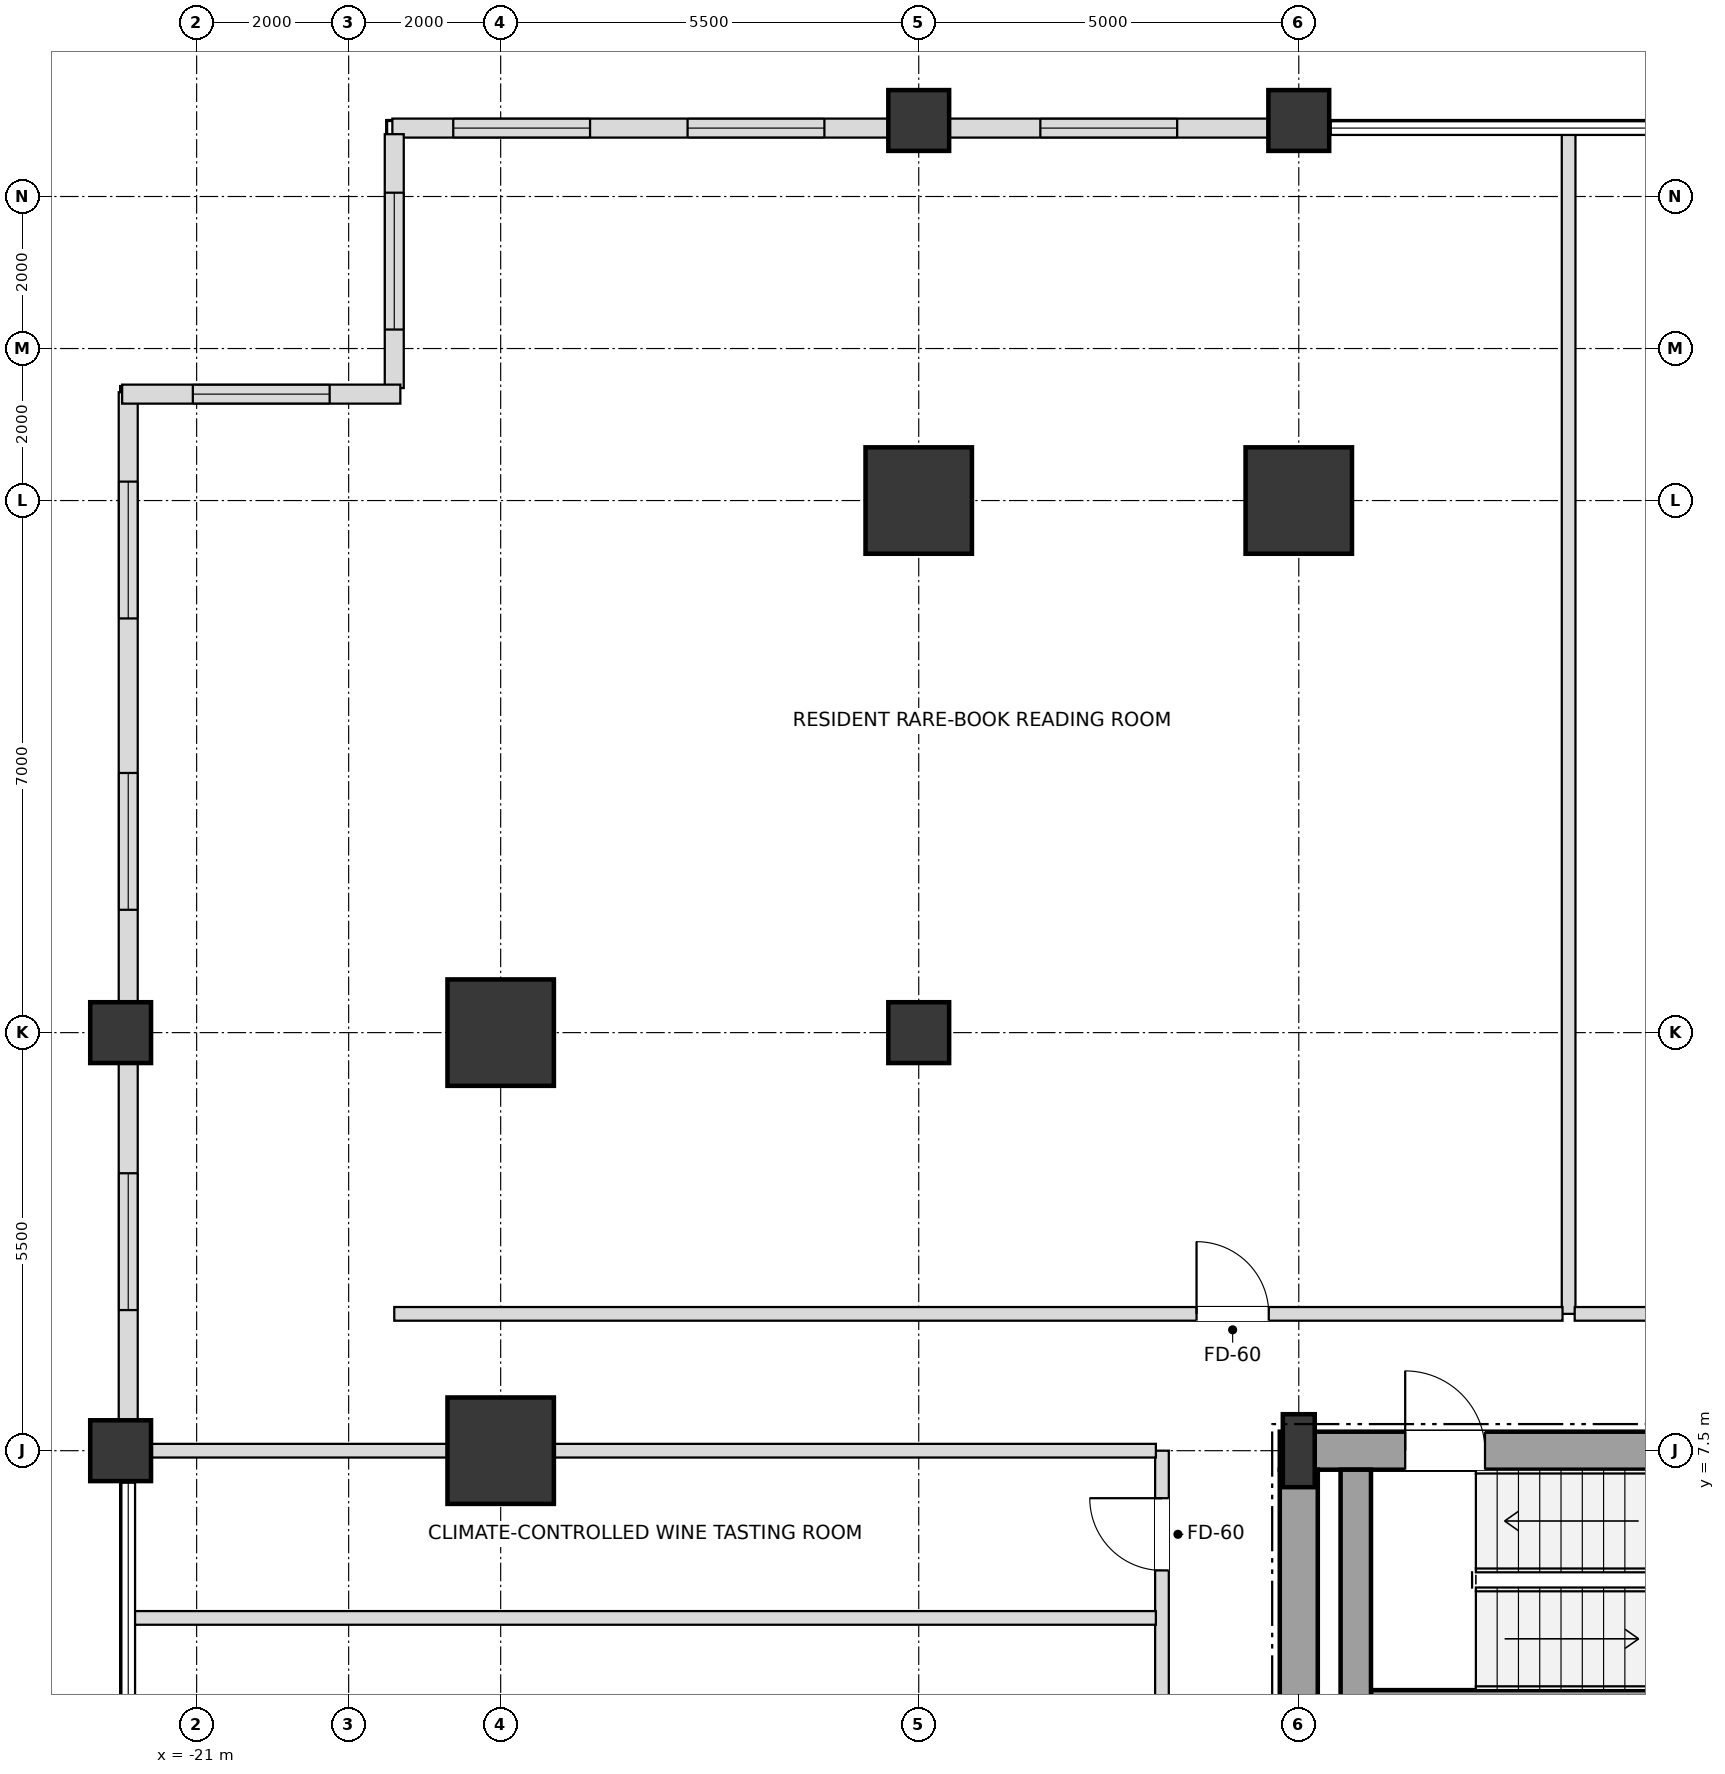
"""IFC4 building model, lengths in metres.
Left out: names, types, materials, properties, quantities, classifications, styles, units other than length and angle.
Written with IfcOpenShell. Run it as: python <this file> out.ifc"""

import sys

from ifc_helpers import new_model, si_unit, direction, frame, frame_2d, origin, origin_2d, place, context, subcontext, project, spatial, rectangle, i_section, extrude, element, fill, save


model = new_model("IFC4")
c1 = context("Model", 3, precision=1e-05, world=origin(), true_north=direction((0.0, 1.0)))
c2 = subcontext(c1, "Body", "Model", "MODEL_VIEW")
j1 = project(units=[si_unit("LENGTHUNIT", "METRE"), si_unit("PLANEANGLEUNIT", "RADIAN")], contexts=[c1])
p1 = place(None, origin())
s1 = spatial("IfcSite", under=j1, at=p1, CompositionType="ELEMENT")
p2 = place(p1, origin())
s2 = spatial("IfcBuilding", under=s1, at=p2, CompositionType="ELEMENT")
p3 = place(p2, frame((0.0, 0.0, 86.4)))
s3 = spatial("IfcBuildingStorey", under=s2, at=p3, CompositionType="ELEMENT", Elevation=86.4)
p4 = place(p3, frame((-6.5, 7.5, 0.0), z_axis=(0.0, 0.0, 1.0), x_axis=(1.0, 0.0, 0.0)))
e1 = element("IfcColumn", 1, at=p4, inside=s3, PredefinedType="COLUMN", context=c2, shape_type="SweptSolid", body=[
    extrude(i_section(OverallWidth=0.42, OverallDepth=0.96, WebThickness=0.022, FlangeThickness=0.034, at=origin_2d()), origin(), (0.0, 0.0, 1.0), 3.6),
])
for number, where, z_axis, x_axis in (
    (2, (-6.5, 20.0, 0.0), (0.0, 0.0, 1.0), (1.0, 0.0, 0.0)),
    (3, (-11.5, 20.0, 0.0), (0.0, 0.0, 1.0), (1.0, 0.0, 0.0)),
    (4, (-17.0, 13.0, 0.0), (0.0, 0.0, 1.0), (1.0, 0.0, 0.0)),
    (5, (-17.0, 7.5, 0.0), (0.0, 0.0, 1.0), (1.0, 0.0, 0.0)),
):
    element("IfcColumn", number, at=place(p3, frame(where, z_axis=z_axis, x_axis=x_axis)), inside=s3, PredefinedType="USERDEFINED", context=c2, shape_type="SweptSolid", body=[
        extrude(rectangle(XDim=1.4, YDim=1.4, at=origin_2d()), origin(), (0.0, 0.0, 1.0), 3.6),
    ])
for number, where, z_axis, x_axis in (
    (6, (-11.5, 13.0, 0.0), (0.0, 0.0, 1.0), (1.0, 0.0, 0.0)),
    (7, (-22.0, 7.5, 0.0), (0.0, 0.0, 1.0), (1.0, 0.0, 0.0)),
    (8, (-22.0, 13.0, 0.0), (0.0, 0.0, 1.0), (1.0, 0.0, 0.0)),
    (9, (-11.5, 25.0, 0.0), (0.0, 0.0, 1.0), (1.0, 0.0, 0.0)),
    (10, (-6.5, 25.0, 0.0), (0.0, 0.0, 1.0), (1.0, 0.0, 0.0)),
):
    element("IfcColumn", number, at=place(p3, frame(where, z_axis=z_axis, x_axis=x_axis)), inside=s3, PredefinedType="COLUMN", context=c2, shape_type="SweptSolid", body=[
        extrude(rectangle(XDim=0.8, YDim=0.8, at=origin_2d()), origin(), (0.0, 0.0, 1.0), 3.6),
    ])
p5 = place(p3, frame((-6.895, 24.9, 0.0), z_axis=(0.0, 0.0, 1.0), x_axis=(-1.0, 0.0, 0.0)))
e11 = element("IfcWall", 11, at=p5, inside=s3, PredefinedType="SOLIDWALL", context=c2, shape_type="SweptSolid", body=[
    extrude(rectangle(XDim=4.21, YDim=0.25, at=frame_2d((2.105, 0.0))), origin(), (0.0, 0.0, 1.0), 2.736),
])
p6 = place(p5, frame((1.205, 0.0, 0.72)))
e12 = element("IfcOpeningElement", 12, at=p6, cuts=e11, PredefinedType="OPENING", context=c2, shape_type="SweptSolid", body=[
    extrude(rectangle(XDim=1.8, YDim=1.68, at=frame_2d((0.9, 0.84))), frame((0.0, 0.135, 0.0), z_axis=(0.0, -1.0, 0.0), x_axis=(1.0, 0.0, 0.0)), (0.0, 0.0, 1.0), 0.27),
])
p7 = place(p3, frame((-11.895, 24.9, 0.0), z_axis=(0.0, 0.0, 1.0), x_axis=(-1.0, 0.0, 0.0)))
e13 = element("IfcWall", 13, at=p7, inside=s3, PredefinedType="SOLIDWALL", context=c2, shape_type="SweptSolid", body=[
    extrude(rectangle(XDim=6.53, YDim=0.25, at=frame_2d((3.265, 0.0))), origin(), (0.0, 0.0, 1.0), 2.736),
])
p8 = place(p7, frame((0.846, 0.0, 0.72)))
e14 = element("IfcOpeningElement", 14, at=p8, cuts=e13, PredefinedType="OPENING", context=c2, shape_type="SweptSolid", body=[
    extrude(rectangle(XDim=1.8, YDim=1.68, at=frame_2d((0.9, 0.84))), frame((0.0, 0.135, 0.0), z_axis=(0.0, -1.0, 0.0), x_axis=(1.0, 0.0, 0.0)), (0.0, 0.0, 1.0), 0.27),
])
p9 = place(p7, frame((3.929, 0.0, 0.72)))
e15 = element("IfcOpeningElement", 15, at=p9, cuts=e13, PredefinedType="OPENING", context=c2, shape_type="SweptSolid", body=[
    extrude(rectangle(XDim=1.8, YDim=1.68, at=frame_2d((0.9, 0.84))), frame((0.0, 0.135, 0.0), z_axis=(0.0, -1.0, 0.0), x_axis=(1.0, 0.0, 0.0)), (0.0, 0.0, 1.0), 0.27),
])
p10 = place(p3, frame((-21.9, 21.425, 0.0), z_axis=(0.0, 0.0, 1.0), x_axis=(0.0, -1.0, 0.0)))
e16 = element("IfcWall", 16, at=p10, inside=s3, PredefinedType="SOLIDWALL", context=c2, shape_type="SweptSolid", body=[
    extrude(rectangle(XDim=8.03, YDim=0.25, at=frame_2d((4.015, 0.0))), origin(), (0.0, 0.0, 1.0), 2.736),
])
p11 = place(p10, frame((1.176, 0.0, 0.72)))
e17 = element("IfcOpeningElement", 17, at=p11, cuts=e16, PredefinedType="OPENING", context=c2, shape_type="SweptSolid", body=[
    extrude(rectangle(XDim=1.8, YDim=1.68, at=frame_2d((0.9, 0.84))), frame((0.0, 0.135, 0.0), z_axis=(0.0, -1.0, 0.0), x_axis=(1.0, 0.0, 0.0)), (0.0, 0.0, 1.0), 0.27),
])
p12 = place(p10, frame((5.009, 0.0, 0.72)))
e18 = element("IfcOpeningElement", 18, at=p12, cuts=e16, PredefinedType="OPENING", context=c2, shape_type="SweptSolid", body=[
    extrude(rectangle(XDim=1.8, YDim=1.68, at=frame_2d((0.9, 0.84))), frame((0.0, 0.135, 0.0), z_axis=(0.0, -1.0, 0.0), x_axis=(1.0, 0.0, 0.0)), (0.0, 0.0, 1.0), 0.27),
])
p13 = place(p3, frame((-21.9, 12.605, 0.0), z_axis=(0.0, 0.0, 1.0), x_axis=(0.0, -1.0, 0.0)))
e19 = element("IfcWall", 19, at=p13, inside=s3, PredefinedType="SOLIDWALL", context=c2, shape_type="SweptSolid", body=[
    extrude(rectangle(XDim=4.71, YDim=0.25, at=frame_2d((2.355, 0.0))), origin(), (0.0, 0.0, 1.0), 2.736),
])
p14 = place(p13, frame((1.455, 0.0, 0.72)))
e20 = element("IfcOpeningElement", 20, at=p14, cuts=e19, PredefinedType="OPENING", context=c2, shape_type="SweptSolid", body=[
    extrude(rectangle(XDim=1.8, YDim=1.68, at=frame_2d((0.9, 0.84))), frame((0.0, 0.135, 0.0), z_axis=(0.0, -1.0, 0.0), x_axis=(1.0, 0.0, 0.0)), (0.0, 0.0, 1.0), 0.27),
])
p15 = place(p3, frame((-18.4, 24.82, 0.0), z_axis=(0.0, 0.0, 1.0), x_axis=(0.0, -1.0, 0.0)))
e21 = element("IfcWall", 21, at=p15, inside=s3, PredefinedType="SOLIDWALL", context=c2, shape_type="SweptSolid", body=[
    extrude(rectangle(XDim=3.34, YDim=0.25, at=frame_2d((1.67, 0.0))), origin(), (0.0, 0.0, 1.0), 2.736),
])
p16 = place(p15, frame((0.77, 0.0, 0.72)))
e22 = element("IfcOpeningElement", 22, at=p16, cuts=e21, PredefinedType="OPENING", context=c2, shape_type="SweptSolid", body=[
    extrude(rectangle(XDim=1.8, YDim=1.68, at=frame_2d((0.9, 0.84))), frame((0.0, 0.135, 0.0), z_axis=(0.0, -1.0, 0.0), x_axis=(1.0, 0.0, 0.0)), (0.0, 0.0, 1.0), 0.27),
])
p17 = place(p3, frame((-18.32, 21.4, 0.0), z_axis=(0.0, 0.0, 1.0), x_axis=(-1.0, 0.0, 0.0)))
e23 = element("IfcWall", 23, at=p17, inside=s3, PredefinedType="SOLIDWALL", context=c2, shape_type="SweptSolid", body=[
    extrude(rectangle(XDim=3.66, YDim=0.25, at=frame_2d((1.83, 0.0))), origin(), (0.0, 0.0, 1.0), 2.736),
])
p18 = place(p17, frame((0.93, 0.0, 0.72)))
e24 = element("IfcOpeningElement", 24, at=p18, cuts=e23, PredefinedType="OPENING", context=c2, shape_type="SweptSolid", body=[
    extrude(rectangle(XDim=1.8, YDim=1.68, at=frame_2d((0.9, 0.84))), frame((0.0, 0.135, 0.0), z_axis=(0.0, -1.0, 0.0), x_axis=(1.0, 0.0, 0.0)), (0.0, 0.0, 1.0), 0.27),
])
p19 = place(p3, frame((-6.75, 7.5, 0.0), z_axis=(0.0, 0.0, 1.0), x_axis=(1.0, 0.0, 0.0)))
e25 = element("IfcWall", 25, at=p19, inside=s3, PredefinedType="SHEAR", context=c2, shape_type="SweptSolid", body=[
    extrude(rectangle(XDim=6.75, YDim=0.5, at=frame_2d((3.375, 0.0))), origin(), (0.0, 0.0, 1.0), 3.38),
])
p20 = place(p19, frame((1.65, 0.0, 0.0)))
e26 = element("IfcOpeningElement", 26, at=p20, cuts=e25, PredefinedType="OPENING", context=c2, shape_type="SweptSolid", body=[
    extrude(rectangle(XDim=1.05, YDim=2.15, at=frame_2d((0.525, 1.075))), frame((0.0, 0.26, 0.0), z_axis=(0.0, -1.0, 0.0), x_axis=(1.0, 0.0, 0.0)), (0.0, 0.0, 1.0), 0.52),
])
p21 = place(p3, frame((-6.5, 3.95, 0.0), z_axis=(0.0, 0.0, 1.0), x_axis=(0.0, 1.0, 0.0)))
e27 = element("IfcWall", 27, at=p21, inside=s3, PredefinedType="SHEAR", context=c2, shape_type="SweptSolid", body=[
    extrude(rectangle(XDim=3.3, YDim=0.5, at=frame_2d((1.65, 0.0))), origin(), (0.0, 0.0, 1.0), 3.38),
])
p22 = place(p3, frame((-5.55, 4.15, 0.0), z_axis=(0.0, 0.0, 1.0), x_axis=(1.0, 0.0, 0.0)))
e28 = element("IfcWall", 28, at=p22, inside=s3, PredefinedType="SHEAR", context=c2, shape_type="SweptSolid", body=[
    extrude(rectangle(XDim=7.08, YDim=0.4, at=frame_2d((3.54, 0.0))), origin(), (0.0, 0.0, 1.0), 3.38),
])
p23 = place(p3, frame((-5.75, 3.95, 0.0), z_axis=(0.0, 0.0, 1.0), x_axis=(0.0, 1.0, 0.0)))
e29 = element("IfcWall", 29, at=p23, inside=s3, PredefinedType="SHEAR", context=c2, shape_type="SweptSolid", body=[
    extrude(rectangle(XDim=3.3, YDim=0.4, at=frame_2d((1.65, 0.0))), origin(), (0.0, 0.0, 1.0), 3.38),
])
p24 = place(p3, frame((-8.3, -7.5, 0.0), z_axis=(0.0, 0.0, 1.0), x_axis=(0.0, 1.0, 0.0)))
e30 = element("IfcWall", 30, at=p24, inside=s3, PredefinedType="PARTITIONING", context=c2, shape_type="SweptSolid", body=[
    extrude(rectangle(XDim=15.0, YDim=0.18, at=frame_2d((7.5, 0.0))), origin(), (0.0, 0.0, 1.0), 3.38),
])
p25 = place(p24, frame((2.075, 0.0, 0.0)))
e31 = element("IfcOpeningElement", 31, at=p25, cuts=e30, PredefinedType="OPENING", context=c2, shape_type="SweptSolid", body=[
    extrude(rectangle(XDim=0.95, YDim=2.15, at=frame_2d((0.475, 1.075))), frame((0.0, 0.1, 0.0), z_axis=(0.0, -1.0, 0.0), x_axis=(1.0, 0.0, 0.0)), (0.0, 0.0, 1.0), 0.2),
])
p26 = place(p24, frame((8.475, 0.0, 0.0)))
e32 = element("IfcOpeningElement", 32, at=p26, cuts=e30, PredefinedType="OPENING", context=c2, shape_type="SweptSolid", body=[
    extrude(rectangle(XDim=0.95, YDim=2.15, at=frame_2d((0.475, 1.075))), frame((0.0, 0.1, 0.0), z_axis=(0.0, -1.0, 0.0), x_axis=(1.0, 0.0, 0.0)), (0.0, 0.0, 1.0), 0.2),
])
p27 = place(p24, frame((13.425, 0.0, 0.0)))
e33 = element("IfcOpeningElement", 33, at=p27, cuts=e30, PredefinedType="OPENING", context=c2, shape_type="SweptSolid", body=[
    extrude(rectangle(XDim=0.95, YDim=2.15, at=frame_2d((0.475, 1.075))), frame((0.0, 0.1, 0.0), z_axis=(0.0, -1.0, 0.0), x_axis=(1.0, 0.0, 0.0)), (0.0, 0.0, 1.0), 0.2),
])
p28 = place(p3, frame((-2.95, 9.3, 0.0), z_axis=(0.0, 0.0, 1.0), x_axis=(0.0, 1.0, 0.0)))
e34 = element("IfcWall", 34, at=p28, inside=s3, PredefinedType="PARTITIONING", context=c2, shape_type="SweptSolid", body=[
    extrude(rectangle(XDim=15.6, YDim=0.18, at=frame_2d((7.8, 0.0))), origin(), (0.0, 0.0, 1.0), 2.816),
])
p29 = place(p3, frame((-21.82, 5.3, 0.0), z_axis=(0.0, 0.0, 1.0), x_axis=(1.0, 0.0, 0.0)))
e35 = element("IfcWall", 35, at=p29, inside=s3, PredefinedType="PARTITIONING", context=c2, shape_type="SweptSolid", body=[
    extrude(rectangle(XDim=13.44, YDim=0.18, at=frame_2d((6.72, 0.0))), origin(), (0.0, 0.0, 1.0), 2.816),
])
p30 = place(p3, frame((-21.9, 7.5, 0.0), z_axis=(0.0, 0.0, 1.0), x_axis=(1.0, 0.0, 0.0)))
e36 = element("IfcWall", 36, at=p30, inside=s3, PredefinedType="PARTITIONING", context=c2, shape_type="SweptSolid", body=[
    extrude(rectangle(XDim=13.52, YDim=0.18, at=frame_2d((6.76, 0.0))), origin(), (0.0, 0.0, 1.0), 2.816),
])
p31 = place(p3, frame((-18.4, 9.3, 0.0), z_axis=(0.0, 0.0, 1.0), x_axis=(1.0, 0.0, 0.0)))
e37 = element("IfcWall", 37, at=p31, inside=s3, PredefinedType="PARTITIONING", context=c2, shape_type="SweptSolid", body=[
    extrude(rectangle(XDim=15.37, YDim=0.18, at=frame_2d((7.685, 0.0))), origin(), (0.0, 0.0, 1.0), 2.816),
])
p32 = place(p31, frame((10.555, 0.0, 0.0)))
e38 = element("IfcOpeningElement", 38, at=p32, cuts=e37, PredefinedType="OPENING", context=c2, shape_type="SweptSolid", body=[
    extrude(rectangle(XDim=0.95, YDim=2.15, at=frame_2d((0.475, 1.075))), frame((0.0, 0.1, 0.0), z_axis=(0.0, -1.0, 0.0), x_axis=(1.0, 0.0, 0.0)), (0.0, 0.0, 1.0), 0.2),
])
p33 = place(p3, frame((-2.87, 9.3, 0.0), z_axis=(0.0, 0.0, 1.0), x_axis=(1.0, 0.0, 0.0)))
e39 = element("IfcWall", 39, at=p33, inside=s3, PredefinedType="PARTITIONING", context=c2, shape_type="SweptSolid", body=[
    extrude(rectangle(XDim=12.79, YDim=0.18, at=frame_2d((6.395, 0.0))), origin(), (0.0, 0.0, 1.0), 2.816),
])
p34 = place(p33, frame((5.925, 0.0, 0.0)))
e40 = element("IfcOpeningElement", 40, at=p34, cuts=e39, PredefinedType="OPENING", context=c2, shape_type="SweptSolid", body=[
    extrude(rectangle(XDim=0.95, YDim=2.15, at=frame_2d((0.475, 1.075))), frame((0.0, 0.1, 0.0), z_axis=(0.0, -1.0, 0.0), x_axis=(1.0, 0.0, 0.0)), (0.0, 0.0, 1.0), 0.2),
])
p35 = place(p6, origin())
e41 = element("IfcWindow", 41, at=p35, inside=s3, PartitioningType="SINGLE_PANEL", PredefinedType="WINDOW", context=c2, shape_type="SweptSolid", body=[
    extrude(rectangle(XDim=1.8, YDim=1.68, at=frame_2d((0.9, 0.84))), frame((0.0, 0.03, 0.0), z_axis=(0.0, -1.0, 0.0), x_axis=(1.0, 0.0, 0.0)), (0.0, 0.0, 1.0), 0.06),
])
fill(e12, e41)
p36 = place(p8, origin())
e42 = element("IfcWindow", 42, at=p36, inside=s3, PartitioningType="SINGLE_PANEL", PredefinedType="WINDOW", context=c2, shape_type="SweptSolid", body=[
    extrude(rectangle(XDim=1.8, YDim=1.68, at=frame_2d((0.9, 0.84))), frame((0.0, 0.03, 0.0), z_axis=(0.0, -1.0, 0.0), x_axis=(1.0, 0.0, 0.0)), (0.0, 0.0, 1.0), 0.06),
])
fill(e14, e42)
p37 = place(p9, origin())
e43 = element("IfcWindow", 43, at=p37, inside=s3, PartitioningType="SINGLE_PANEL", PredefinedType="WINDOW", context=c2, shape_type="SweptSolid", body=[
    extrude(rectangle(XDim=1.8, YDim=1.68, at=frame_2d((0.9, 0.84))), frame((0.0, 0.03, 0.0), z_axis=(0.0, -1.0, 0.0), x_axis=(1.0, 0.0, 0.0)), (0.0, 0.0, 1.0), 0.06),
])
fill(e15, e43)
p38 = place(p11, origin())
e44 = element("IfcWindow", 44, at=p38, inside=s3, PartitioningType="SINGLE_PANEL", PredefinedType="WINDOW", context=c2, shape_type="SweptSolid", body=[
    extrude(rectangle(XDim=1.8, YDim=1.68, at=frame_2d((0.9, 0.84))), frame((0.0, 0.03, 0.0), z_axis=(0.0, -1.0, 0.0), x_axis=(1.0, 0.0, 0.0)), (0.0, 0.0, 1.0), 0.06),
])
fill(e17, e44)
p39 = place(p12, origin())
e45 = element("IfcWindow", 45, at=p39, inside=s3, PartitioningType="SINGLE_PANEL", PredefinedType="WINDOW", context=c2, shape_type="SweptSolid", body=[
    extrude(rectangle(XDim=1.8, YDim=1.68, at=frame_2d((0.9, 0.84))), frame((0.0, 0.03, 0.0), z_axis=(0.0, -1.0, 0.0), x_axis=(1.0, 0.0, 0.0)), (0.0, 0.0, 1.0), 0.06),
])
fill(e18, e45)
p40 = place(p14, origin())
e46 = element("IfcWindow", 46, at=p40, inside=s3, PartitioningType="SINGLE_PANEL", PredefinedType="WINDOW", context=c2, shape_type="SweptSolid", body=[
    extrude(rectangle(XDim=1.8, YDim=1.68, at=frame_2d((0.9, 0.84))), frame((0.0, 0.03, 0.0), z_axis=(0.0, -1.0, 0.0), x_axis=(1.0, 0.0, 0.0)), (0.0, 0.0, 1.0), 0.06),
])
fill(e20, e46)
p41 = place(p16, origin())
e47 = element("IfcWindow", 47, at=p41, inside=s3, PartitioningType="SINGLE_PANEL", PredefinedType="WINDOW", context=c2, shape_type="SweptSolid", body=[
    extrude(rectangle(XDim=1.8, YDim=1.68, at=frame_2d((0.9, 0.84))), frame((0.0, 0.03, 0.0), z_axis=(0.0, -1.0, 0.0), x_axis=(1.0, 0.0, 0.0)), (0.0, 0.0, 1.0), 0.06),
])
fill(e22, e47)
p42 = place(p18, origin())
e48 = element("IfcWindow", 48, at=p42, inside=s3, PartitioningType="SINGLE_PANEL", PredefinedType="WINDOW", context=c2, shape_type="SweptSolid", body=[
    extrude(rectangle(XDim=1.8, YDim=1.68, at=frame_2d((0.9, 0.84))), frame((0.0, 0.03, 0.0), z_axis=(0.0, -1.0, 0.0), x_axis=(1.0, 0.0, 0.0)), (0.0, 0.0, 1.0), 0.06),
])
fill(e24, e48)
p43 = place(p20, origin())
e49 = element("IfcDoor", 49, at=p43, inside=s3, OperationType="SINGLE_SWING_LEFT", PredefinedType="DOOR", context=c2, shape_type="SweptSolid", body=[
    extrude(rectangle(XDim=1.05, YDim=2.15, at=frame_2d((0.525, 1.075))), frame((0.0, 0.025, 0.0), z_axis=(0.0, -1.0, 0.0), x_axis=(1.0, 0.0, 0.0)), (0.0, 0.0, 1.0), 0.05),
])
fill(e26, e49)
p44 = place(p32, origin())
e50 = element("IfcDoor", 50, at=p44, inside=s3, OperationType="SINGLE_SWING_LEFT", PredefinedType="DOOR", context=c2, shape_type="SweptSolid", body=[
    extrude(rectangle(XDim=0.95, YDim=2.15, at=frame_2d((0.475, 1.075))), frame((0.0, 0.025, 0.0), z_axis=(0.0, -1.0, 0.0), x_axis=(1.0, 0.0, 0.0)), (0.0, 0.0, 1.0), 0.05),
])
fill(e38, e50)
p45 = place(p27, origin())
e51 = element("IfcDoor", 51, at=p45, inside=s3, OperationType="SINGLE_SWING_RIGHT", PredefinedType="DOOR", context=c2, shape_type="SweptSolid", body=[
    extrude(rectangle(XDim=0.95, YDim=2.15, at=frame_2d((0.475, 1.075))), frame((0.0, 0.025, 0.0), z_axis=(0.0, -1.0, 0.0), x_axis=(1.0, 0.0, 0.0)), (0.0, 0.0, 1.0), 0.05),
])
fill(e33, e51)
save(model, sys.argv[1])
